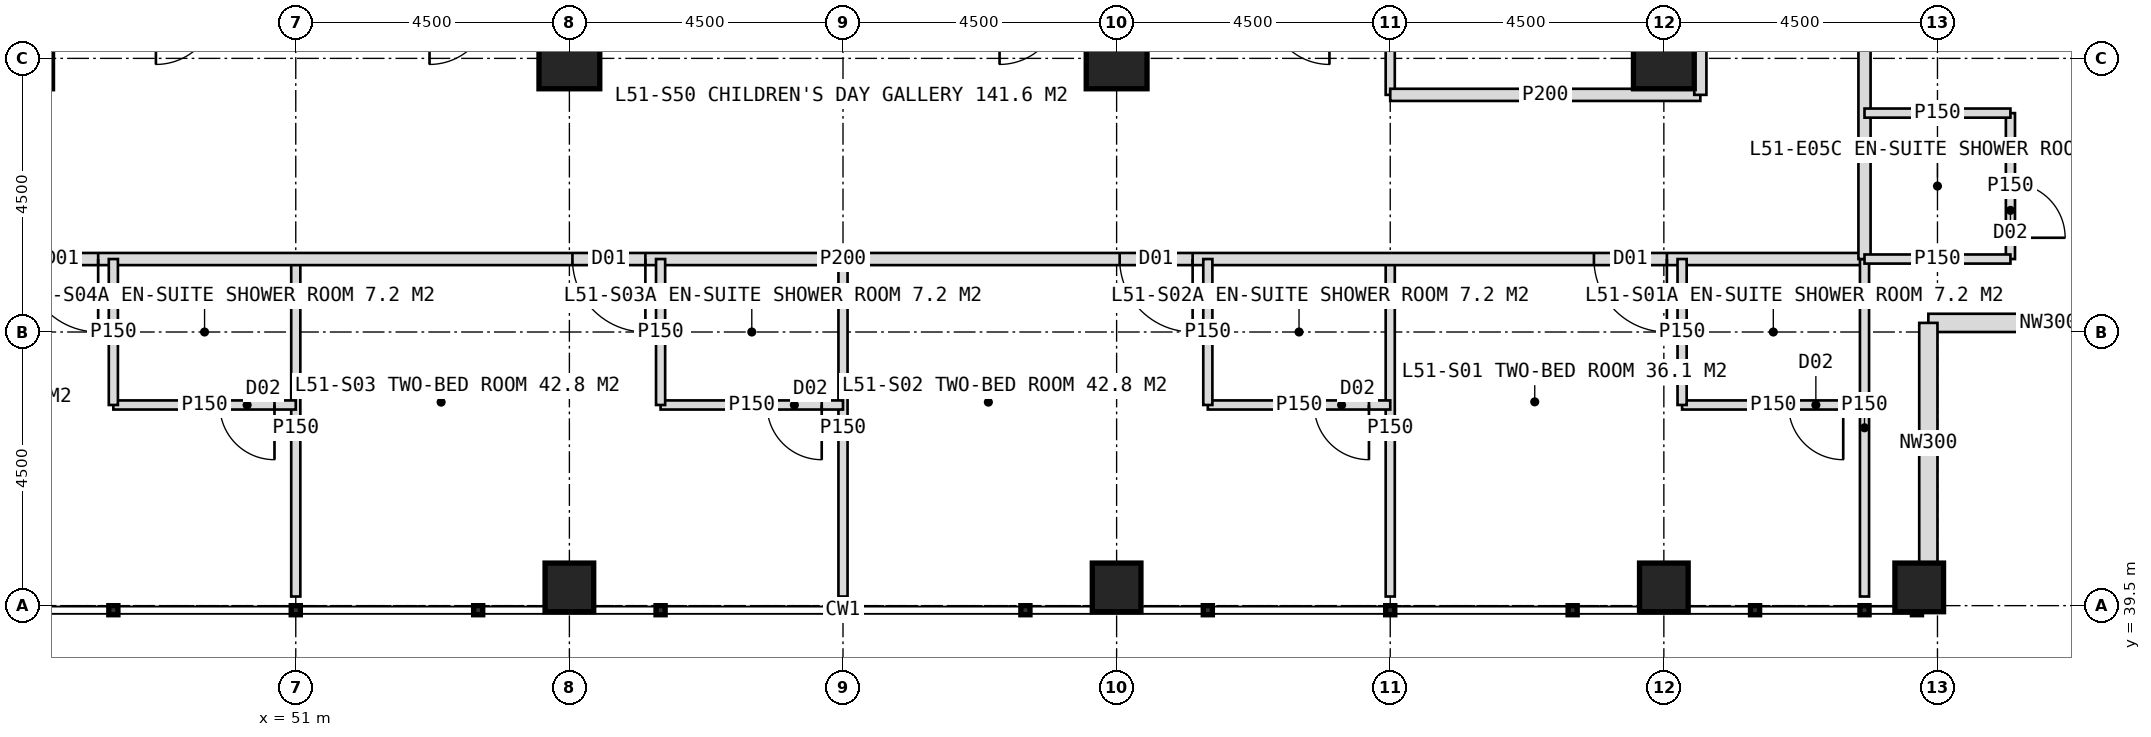
"""IFC4 building model, lengths in metres.
Left out: names, types, materials, properties, quantities, classifications, styles, units other than length and angle.
Written with IfcOpenShell. Run it as: python <this file> out.ifc"""

import sys

from ifc_helpers import new_model, si_unit, direction, frame, frame_2d, origin, origin_2d, place, context, subcontext, project, spatial, rectangle, hollow_rectangle, extrude, element, fill, save


model = new_model("IFC4")
c1 = context("Model", 3, precision=1e-05, world=origin(), true_north=direction((0.0, 1.0)))
c2 = subcontext(c1, "Body", "Model", "MODEL_VIEW")
j1 = project(units=[si_unit("LENGTHUNIT", "METRE"), si_unit("PLANEANGLEUNIT", "RADIAN")], contexts=[c1])
p1 = place(None, origin())
s1 = spatial("IfcSite", under=j1, at=p1, CompositionType="ELEMENT")
p2 = place(p1, origin())
s2 = spatial("IfcBuilding", under=s1, at=p2, CompositionType="ELEMENT")
p3 = place(p2, frame((0.0, 0.0, 213.0)))
s3 = spatial("IfcBuildingStorey", under=s2, at=p3, CompositionType="ELEMENT", Elevation=213.0)
for number, where, z_axis, x_axis in (
    (1, (73.5, 48.5, 0.0), (0.0, 0.0, 1.0), (1.0, 0.0, 0.0)),
    (2, (55.5, 48.5, 0.0), (0.0, 0.0, 1.0), (1.0, 0.0, 0.0)),
    (3, (64.5, 48.5, 0.0), (0.0, 0.0, 1.0), (1.0, 0.0, 0.0)),
):
    element("IfcColumn", number, at=place(p3, frame(where, z_axis=z_axis, x_axis=x_axis)), inside=s3, PredefinedType="COLUMN", context=c2, shape_type="SweptSolid", body=[
        extrude(hollow_rectangle(XDim=1.0, YDim=1.0, WallThickness=0.1, at=origin_2d()), origin(), (0.0, 0.0, 1.0), 4.0),
    ])
for number, where, z_axis, x_axis in (
    (4, (55.5, 39.8, 0.0), (0.0, 0.0, 1.0), (1.0, 0.0, 0.0)),
    (5, (64.5, 39.8, 0.0), (0.0, 0.0, 1.0), (1.0, 0.0, 0.0)),
    (6, (73.5, 39.8, 0.0), (0.0, 0.0, 1.0), (1.0, 0.0, 0.0)),
    (7, (77.7, 39.8, 0.0), (0.0, 0.0, 1.0), (1.0, 0.0, 0.0)),
):
    element("IfcColumn", number, at=place(p3, frame(where, z_axis=z_axis, x_axis=x_axis)), inside=s3, PredefinedType="COLUMN", context=c2, shape_type="SweptSolid", body=[
        extrude(hollow_rectangle(XDim=0.8, YDim=0.8, WallThickness=0.08, at=origin_2d()), origin(), (0.0, 0.0, 1.0), 4.0),
    ])
for number, where, z_axis, x_axis in (
    (8, (81.8, 44.15, 0.0), (0.0, 0.0, 1.0), (-1.0, 0.0, 0.0)),
    (9, (77.85, 44.15, 0.0), (0.0, 0.0, 1.0), (0.0, -1.0, 0.0)),
):
    element("IfcWall", number, at=place(p3, frame(where, z_axis=z_axis, x_axis=x_axis)), inside=s3, PredefinedType="ELEMENTEDWALL", context=c2, shape_type="SweptSolid", body=[
        extrude(rectangle(XDim=3.95, YDim=0.3, at=frame_2d((1.975, 0.0))), origin(), (0.0, 0.0, 1.0), 2.85),
    ])
p4 = place(p3, frame((69.0, 45.2, 0.0), z_axis=(0.0, 0.0, 1.0), x_axis=(0.0, -1.0, 0.0)))
e10 = element("IfcWall", 10, at=p4, inside=s3, PredefinedType="PARTITIONING", context=c2, shape_type="SweptSolid", body=[
    extrude(rectangle(XDim=5.55, YDim=0.15, at=frame_2d((2.775, 0.0))), origin(), (0.0, 0.0, 1.0), 3.75),
])
p5 = place(p3, frame((60.0, 45.2, 0.0), z_axis=(0.0, 0.0, 1.0), x_axis=(0.0, -1.0, 0.0)))
e11 = element("IfcWall", 11, at=p5, inside=s3, PredefinedType="PARTITIONING", context=c2, shape_type="SweptSolid", body=[
    extrude(rectangle(XDim=5.55, YDim=0.15, at=frame_2d((2.775, 0.0))), origin(), (0.0, 0.0, 1.0), 2.95),
])
p6 = place(p3, frame((51.0, 45.2, 0.0), z_axis=(0.0, 0.0, 1.0), x_axis=(0.0, -1.0, 0.0)))
e12 = element("IfcWall", 12, at=p6, inside=s3, PredefinedType="PARTITIONING", context=c2, shape_type="SweptSolid", body=[
    extrude(rectangle(XDim=5.55, YDim=0.15, at=frame_2d((2.775, 0.0))), origin(), (0.0, 0.0, 1.0), 3.75),
])
p7 = place(p3, frame((76.8, 45.2, 0.0), z_axis=(0.0, 0.0, 1.0), x_axis=(-1.0, 0.0, 0.0)))
e13 = element("IfcWall", 13, at=p7, inside=s3, PredefinedType="PARTITIONING", context=c2, shape_type="SweptSolid", body=[
    extrude(rectangle(XDim=33.6, YDim=0.2, at=frame_2d((16.8, 0.0))), origin(), (0.0, 0.0, 1.0), 3.75),
])
p8 = place(p7, frame((3.25, 0.0, 0.0)))
e14 = element("IfcOpeningElement", 14, at=p8, cuts=e13, PredefinedType="OPENING", context=c2, shape_type="SweptSolid", body=[
    extrude(rectangle(XDim=1.2, YDim=2.2, at=frame_2d((0.6, 1.1))), frame((0.0, 0.11, 0.0), z_axis=(0.0, -1.0, 0.0), x_axis=(1.0, 0.0, 0.0)), (0.0, 0.0, 1.0), 0.22),
])
p9 = place(p7, frame((11.05, 0.0, 0.0)))
e15 = element("IfcOpeningElement", 15, at=p9, cuts=e13, PredefinedType="OPENING", context=c2, shape_type="SweptSolid", body=[
    extrude(rectangle(XDim=1.2, YDim=2.2, at=frame_2d((0.6, 1.1))), frame((0.0, 0.11, 0.0), z_axis=(0.0, -1.0, 0.0), x_axis=(1.0, 0.0, 0.0)), (0.0, 0.0, 1.0), 0.22),
])
p10 = place(p7, frame((20.05, 0.0, 0.0)))
e16 = element("IfcOpeningElement", 16, at=p10, cuts=e13, PredefinedType="OPENING", context=c2, shape_type="SweptSolid", body=[
    extrude(rectangle(XDim=1.2, YDim=2.2, at=frame_2d((0.6, 1.1))), frame((0.0, 0.11, 0.0), z_axis=(0.0, -1.0, 0.0), x_axis=(1.0, 0.0, 0.0)), (0.0, 0.0, 1.0), 0.22),
])
p11 = place(p7, frame((29.05, 0.0, 0.0)))
e17 = element("IfcOpeningElement", 17, at=p11, cuts=e13, PredefinedType="OPENING", context=c2, shape_type="SweptSolid", body=[
    extrude(rectangle(XDim=1.2, YDim=2.2, at=frame_2d((0.6, 1.1))), frame((0.0, 0.11, 0.0), z_axis=(0.0, -1.0, 0.0), x_axis=(1.0, 0.0, 0.0)), (0.0, 0.0, 1.0), 0.22),
])
p12 = place(p3, frame((76.8, 45.2, 0.0), z_axis=(0.0, 0.0, 1.0), x_axis=(0.0, -1.0, 0.0)))
e18 = element("IfcWall", 18, at=p12, inside=s3, PredefinedType="PARTITIONING", context=c2, shape_type="SweptSolid", body=[
    extrude(rectangle(XDim=5.55, YDim=0.15, at=frame_2d((2.775, 0.0))), origin(), (0.0, 0.0, 1.0), 3.75),
])
p13 = place(p3, frame((76.8, 42.8, 0.0), z_axis=(0.0, 0.0, 1.0), x_axis=(-1.0, 0.0, 0.0)))
e19 = element("IfcWall", 19, at=p13, inside=s3, PredefinedType="PARTITIONING", context=c2, shape_type="SweptSolid", body=[
    extrude(rectangle(XDim=3.0, YDim=0.15, at=frame_2d((1.5, 0.0))), origin(), (0.0, 0.0, 1.0), 3.75),
])
p14 = place(p13, frame((0.35, 0.0, 0.0)))
e20 = element("IfcOpeningElement", 20, at=p14, cuts=e19, PredefinedType="OPENING", context=c2, shape_type="SweptSolid", body=[
    extrude(rectangle(XDim=0.9, YDim=2.1, at=frame_2d((0.45, 1.05))), frame((0.0, 0.085, 0.0), z_axis=(0.0, -1.0, 0.0), x_axis=(1.0, 0.0, 0.0)), (0.0, 0.0, 1.0), 0.17),
])
p15 = place(p3, frame((73.8, 45.2, 0.0), z_axis=(0.0, 0.0, 1.0), x_axis=(0.0, -1.0, 0.0)))
e21 = element("IfcWall", 21, at=p15, inside=s3, PredefinedType="PARTITIONING", context=c2, shape_type="SweptSolid", body=[
    extrude(rectangle(XDim=2.4, YDim=0.15, at=frame_2d((1.2, 0.0))), origin(), (0.0, 0.0, 1.0), 3.75),
])
p16 = place(p3, frame((69.0, 42.8, 0.0), z_axis=(0.0, 0.0, 1.0), x_axis=(-1.0, 0.0, 0.0)))
e22 = element("IfcWall", 22, at=p16, inside=s3, PredefinedType="PARTITIONING", context=c2, shape_type="SweptSolid", body=[
    extrude(rectangle(XDim=3.0, YDim=0.15, at=frame_2d((1.5, 0.0))), origin(), (0.0, 0.0, 1.0), 3.75),
])
p17 = place(p16, frame((0.35, 0.0, 0.0)))
e23 = element("IfcOpeningElement", 23, at=p17, cuts=e22, PredefinedType="OPENING", context=c2, shape_type="SweptSolid", body=[
    extrude(rectangle(XDim=0.9, YDim=2.1, at=frame_2d((0.45, 1.05))), frame((0.0, 0.085, 0.0), z_axis=(0.0, -1.0, 0.0), x_axis=(1.0, 0.0, 0.0)), (0.0, 0.0, 1.0), 0.17),
])
p18 = place(p3, frame((66.0, 45.2, 0.0), z_axis=(0.0, 0.0, 1.0), x_axis=(0.0, -1.0, 0.0)))
e24 = element("IfcWall", 24, at=p18, inside=s3, PredefinedType="PARTITIONING", context=c2, shape_type="SweptSolid", body=[
    extrude(rectangle(XDim=2.4, YDim=0.15, at=frame_2d((1.2, 0.0))), origin(), (0.0, 0.0, 1.0), 3.75),
])
p19 = place(p3, frame((60.0, 42.8, 0.0), z_axis=(0.0, 0.0, 1.0), x_axis=(-1.0, 0.0, 0.0)))
e25 = element("IfcWall", 25, at=p19, inside=s3, PredefinedType="PARTITIONING", context=c2, shape_type="SweptSolid", body=[
    extrude(rectangle(XDim=3.0, YDim=0.15, at=frame_2d((1.5, 0.0))), origin(), (0.0, 0.0, 1.0), 3.75),
])
p20 = place(p19, frame((0.35, 0.0, 0.0)))
e26 = element("IfcOpeningElement", 26, at=p20, cuts=e25, PredefinedType="OPENING", context=c2, shape_type="SweptSolid", body=[
    extrude(rectangle(XDim=0.9, YDim=2.1, at=frame_2d((0.45, 1.05))), frame((0.0, 0.085, 0.0), z_axis=(0.0, -1.0, 0.0), x_axis=(1.0, 0.0, 0.0)), (0.0, 0.0, 1.0), 0.17),
])
p21 = place(p3, frame((57.0, 45.2, 0.0), z_axis=(0.0, 0.0, 1.0), x_axis=(0.0, -1.0, 0.0)))
e27 = element("IfcWall", 27, at=p21, inside=s3, PredefinedType="PARTITIONING", context=c2, shape_type="SweptSolid", body=[
    extrude(rectangle(XDim=2.4, YDim=0.15, at=frame_2d((1.2, 0.0))), origin(), (0.0, 0.0, 1.0), 3.75),
])
p22 = place(p3, frame((51.0, 42.8, 0.0), z_axis=(0.0, 0.0, 1.0), x_axis=(-1.0, 0.0, 0.0)))
e28 = element("IfcWall", 28, at=p22, inside=s3, PredefinedType="PARTITIONING", context=c2, shape_type="SweptSolid", body=[
    extrude(rectangle(XDim=3.0, YDim=0.15, at=frame_2d((1.5, 0.0))), origin(), (0.0, 0.0, 1.0), 3.75),
])
p23 = place(p22, frame((0.35, 0.0, 0.0)))
e29 = element("IfcOpeningElement", 29, at=p23, cuts=e28, PredefinedType="OPENING", context=c2, shape_type="SweptSolid", body=[
    extrude(rectangle(XDim=0.9, YDim=2.1, at=frame_2d((0.45, 1.05))), frame((0.0, 0.085, 0.0), z_axis=(0.0, -1.0, 0.0), x_axis=(1.0, 0.0, 0.0)), (0.0, 0.0, 1.0), 0.17),
])
p24 = place(p3, frame((48.0, 45.2, 0.0), z_axis=(0.0, 0.0, 1.0), x_axis=(0.0, -1.0, 0.0)))
e30 = element("IfcWall", 30, at=p24, inside=s3, PredefinedType="PARTITIONING", context=c2, shape_type="SweptSolid", body=[
    extrude(rectangle(XDim=2.4, YDim=0.15, at=frame_2d((1.2, 0.0))), origin(), (0.0, 0.0, 1.0), 3.75),
])
p25 = place(p3, frame((69.0, 53.0, 0.0), z_axis=(0.0, 0.0, 1.0), x_axis=(0.0, -1.0, 0.0)))
e31 = element("IfcWall", 31, at=p25, inside=s3, PredefinedType="PARTITIONING", context=c2, shape_type="SweptSolid", body=[
    extrude(rectangle(XDim=5.1, YDim=0.15, at=frame_2d((2.55, 0.0))), origin(), (0.0, 0.0, 1.0), 3.75),
])
p26 = place(p3, frame((74.1, 47.9, 0.0), z_axis=(0.0, 0.0, 1.0), x_axis=(-1.0, 0.0, 0.0)))
e32 = element("IfcWall", 32, at=p26, inside=s3, PredefinedType="PARTITIONING", context=c2, shape_type="SweptSolid", body=[
    extrude(rectangle(XDim=5.1, YDim=0.2, at=frame_2d((2.55, 0.0))), origin(), (0.0, 0.0, 1.0), 3.75),
])
p27 = place(p3, frame((76.8, 78.8, 0.0), z_axis=(0.0, 0.0, 1.0), x_axis=(0.0, -1.0, 0.0)))
e33 = element("IfcWall", 33, at=p27, inside=s3, PredefinedType="PARTITIONING", context=c2, shape_type="SweptSolid", body=[
    extrude(rectangle(XDim=33.6, YDim=0.2, at=frame_2d((16.8, 0.0))), origin(), (0.0, 0.0, 1.0), 3.75),
])
p28 = place(p27, frame((3.25, 0.0, 0.0)))
e34 = element("IfcOpeningElement", 34, at=p28, cuts=e33, PredefinedType="OPENING", context=c2, shape_type="SweptSolid", body=[
    extrude(rectangle(XDim=1.2, YDim=2.2, at=frame_2d((0.6, 1.1))), frame((0.0, 0.11, 0.0), z_axis=(0.0, -1.0, 0.0), x_axis=(1.0, 0.0, 0.0)), (0.0, 0.0, 1.0), 0.22),
])
p29 = place(p27, frame((10.45, 0.0, 0.0)))
e35 = element("IfcOpeningElement", 35, at=p29, cuts=e33, PredefinedType="OPENING", context=c2, shape_type="SweptSolid", body=[
    extrude(rectangle(XDim=1.2, YDim=2.2, at=frame_2d((0.6, 1.1))), frame((0.0, 0.11, 0.0), z_axis=(0.0, -1.0, 0.0), x_axis=(1.0, 0.0, 0.0)), (0.0, 0.0, 1.0), 0.22),
])
p30 = place(p27, frame((14.8, 0.0, 0.0)))
e36 = element("IfcOpeningElement", 36, at=p30, cuts=e33, PredefinedType="OPENING", context=c2, shape_type="SweptSolid", body=[
    extrude(rectangle(XDim=1.0, YDim=2.1, at=frame_2d((0.5, 1.05))), frame((0.0, 0.11, 0.0), z_axis=(0.0, -1.0, 0.0), x_axis=(1.0, 0.0, 0.0)), (0.0, 0.0, 1.0), 0.22),
])
p31 = place(p27, frame((20.05, 0.0, 0.0)))
e37 = element("IfcOpeningElement", 37, at=p31, cuts=e33, PredefinedType="OPENING", context=c2, shape_type="SweptSolid", body=[
    extrude(rectangle(XDim=1.2, YDim=2.2, at=frame_2d((0.6, 1.1))), frame((0.0, 0.11, 0.0), z_axis=(0.0, -1.0, 0.0), x_axis=(1.0, 0.0, 0.0)), (0.0, 0.0, 1.0), 0.22),
])
p32 = place(p27, frame((26.95, 0.0, 0.0)))
e38 = element("IfcOpeningElement", 38, at=p32, cuts=e33, PredefinedType="OPENING", context=c2, shape_type="SweptSolid", body=[
    extrude(rectangle(XDim=1.2, YDim=2.2, at=frame_2d((0.6, 1.1))), frame((0.0, 0.11, 0.0), z_axis=(0.0, -1.0, 0.0), x_axis=(1.0, 0.0, 0.0)), (0.0, 0.0, 1.0), 0.22),
])
p33 = place(p3, frame((79.2, 47.6, 0.0), z_axis=(0.0, 0.0, 1.0), x_axis=(0.0, -1.0, 0.0)))
e39 = element("IfcWall", 39, at=p33, inside=s3, PredefinedType="PARTITIONING", context=c2, shape_type="SweptSolid", body=[
    extrude(rectangle(XDim=2.4, YDim=0.15, at=frame_2d((1.2, 0.0))), origin(), (0.0, 0.0, 1.0), 3.75),
])
p34 = place(p33, frame((1.15, 0.0, 0.0)))
e40 = element("IfcOpeningElement", 40, at=p34, cuts=e39, PredefinedType="OPENING", context=c2, shape_type="SweptSolid", body=[
    extrude(rectangle(XDim=0.9, YDim=2.1, at=frame_2d((0.45, 1.05))), frame((0.0, 0.085, 0.0), z_axis=(0.0, -1.0, 0.0), x_axis=(1.0, 0.0, 0.0)), (0.0, 0.0, 1.0), 0.17),
])
for number, where, z_axis, x_axis in (
    (41, (76.8, 47.6, 0.0), (0.0, 0.0, 1.0), (1.0, 0.0, 0.0)),
    (42, (76.8, 45.2, 0.0), (0.0, 0.0, 1.0), (1.0, 0.0, 0.0)),
):
    element("IfcWall", number, at=place(p3, frame(where, z_axis=z_axis, x_axis=x_axis)), inside=s3, PredefinedType="PARTITIONING", context=c2, shape_type="SweptSolid", body=[
        extrude(rectangle(XDim=2.4, YDim=0.15, at=frame_2d((1.2, 0.0))), origin(), (0.0, 0.0, 1.0), 3.75),
    ])
p35 = place(p3, frame((74.1, 62.0, 0.0), z_axis=(0.0, 0.0, 1.0), x_axis=(0.0, -1.0, 0.0)))
e43 = element("IfcWall", 43, at=p35, inside=s3, PredefinedType="PARTITIONING", context=c2, shape_type="SweptSolid", body=[
    extrude(rectangle(XDim=14.1, YDim=0.2, at=frame_2d((7.05, 0.0))), origin(), (0.0, 0.0, 1.0), 3.75),
])
p36 = place(p35, frame((1.45, 0.0, 0.0)))
e44 = element("IfcOpeningElement", 44, at=p36, cuts=e43, PredefinedType="OPENING", context=c2, shape_type="SweptSolid", body=[
    extrude(rectangle(XDim=1.0, YDim=2.1, at=frame_2d((0.5, 1.05))), frame((0.0, 0.11, 0.0), z_axis=(0.0, -1.0, 0.0), x_axis=(1.0, 0.0, 0.0)), (0.0, 0.0, 1.0), 0.22),
])
p37 = place(p35, frame((10.3, 0.0, 0.0)))
e45 = element("IfcOpeningElement", 45, at=p37, cuts=e43, PredefinedType="OPENING", context=c2, shape_type="SweptSolid", body=[
    extrude(rectangle(XDim=1.0, YDim=2.1, at=frame_2d((0.5, 1.05))), frame((0.0, 0.11, 0.0), z_axis=(0.0, -1.0, 0.0), x_axis=(1.0, 0.0, 0.0)), (0.0, 0.0, 1.0), 0.22),
])
p38 = place(p8, origin())
e46 = element("IfcDoor", 46, at=p38, inside=s3, OperationType="SINGLE_SWING_LEFT", PredefinedType="DOOR", context=c2, shape_type="SweptSolid", body=[
    extrude(rectangle(XDim=1.2, YDim=2.2, at=frame_2d((0.6, 1.1))), frame((0.0, 0.025, 0.0), z_axis=(0.0, -1.0, 0.0), x_axis=(1.0, 0.0, 0.0)), (0.0, 0.0, 1.0), 0.05),
])
fill(e14, e46)
p39 = place(p14, origin())
e47 = element("IfcDoor", 47, at=p39, inside=s3, OperationType="SINGLE_SWING_LEFT", PredefinedType="DOOR", context=c2, shape_type="SweptSolid", body=[
    extrude(rectangle(XDim=0.9, YDim=2.1, at=frame_2d((0.45, 1.05))), frame((0.0, 0.025, 0.0), z_axis=(0.0, -1.0, 0.0), x_axis=(1.0, 0.0, 0.0)), (0.0, 0.0, 1.0), 0.05),
])
fill(e20, e47)
p40 = place(p9, origin())
e48 = element("IfcDoor", 48, at=p40, inside=s3, OperationType="SINGLE_SWING_LEFT", PredefinedType="DOOR", context=c2, shape_type="SweptSolid", body=[
    extrude(rectangle(XDim=1.2, YDim=2.2, at=frame_2d((0.6, 1.1))), frame((0.0, 0.025, 0.0), z_axis=(0.0, -1.0, 0.0), x_axis=(1.0, 0.0, 0.0)), (0.0, 0.0, 1.0), 0.05),
])
fill(e15, e48)
p41 = place(p17, origin())
e49 = element("IfcDoor", 49, at=p41, inside=s3, OperationType="SINGLE_SWING_LEFT", PredefinedType="DOOR", context=c2, shape_type="SweptSolid", body=[
    extrude(rectangle(XDim=0.9, YDim=2.1, at=frame_2d((0.45, 1.05))), frame((0.0, 0.025, 0.0), z_axis=(0.0, -1.0, 0.0), x_axis=(1.0, 0.0, 0.0)), (0.0, 0.0, 1.0), 0.05),
])
fill(e23, e49)
p42 = place(p10, origin())
e50 = element("IfcDoor", 50, at=p42, inside=s3, OperationType="SINGLE_SWING_LEFT", PredefinedType="DOOR", context=c2, shape_type="SweptSolid", body=[
    extrude(rectangle(XDim=1.2, YDim=2.2, at=frame_2d((0.6, 1.1))), frame((0.0, 0.025, 0.0), z_axis=(0.0, -1.0, 0.0), x_axis=(1.0, 0.0, 0.0)), (0.0, 0.0, 1.0), 0.05),
])
fill(e16, e50)
p43 = place(p20, origin())
e51 = element("IfcDoor", 51, at=p43, inside=s3, OperationType="SINGLE_SWING_LEFT", PredefinedType="DOOR", context=c2, shape_type="SweptSolid", body=[
    extrude(rectangle(XDim=0.9, YDim=2.1, at=frame_2d((0.45, 1.05))), frame((0.0, 0.025, 0.0), z_axis=(0.0, -1.0, 0.0), x_axis=(1.0, 0.0, 0.0)), (0.0, 0.0, 1.0), 0.05),
])
fill(e26, e51)
p44 = place(p11, origin())
e52 = element("IfcDoor", 52, at=p44, inside=s3, OperationType="SINGLE_SWING_LEFT", PredefinedType="DOOR", context=c2, shape_type="SweptSolid", body=[
    extrude(rectangle(XDim=1.2, YDim=2.2, at=frame_2d((0.6, 1.1))), frame((0.0, 0.025, 0.0), z_axis=(0.0, -1.0, 0.0), x_axis=(1.0, 0.0, 0.0)), (0.0, 0.0, 1.0), 0.05),
])
fill(e17, e52)
p45 = place(p23, origin())
e53 = element("IfcDoor", 53, at=p45, inside=s3, OperationType="SINGLE_SWING_LEFT", PredefinedType="DOOR", context=c2, shape_type="SweptSolid", body=[
    extrude(rectangle(XDim=0.9, YDim=2.1, at=frame_2d((0.45, 1.05))), frame((0.0, 0.025, 0.0), z_axis=(0.0, -1.0, 0.0), x_axis=(1.0, 0.0, 0.0)), (0.0, 0.0, 1.0), 0.05),
])
fill(e29, e53)
p46 = place(p34, origin())
e54 = element("IfcDoor", 54, at=p46, inside=s3, OperationType="SINGLE_SWING_RIGHT", PredefinedType="DOOR", context=c2, shape_type="SweptSolid", body=[
    extrude(rectangle(XDim=0.9, YDim=2.1, at=frame_2d((0.45, 1.05))), frame((0.0, 0.025, 0.0), z_axis=(0.0, -1.0, 0.0), x_axis=(1.0, 0.0, 0.0)), (0.0, 0.0, 1.0), 0.05),
])
fill(e40, e54)
save(model, sys.argv[1])
